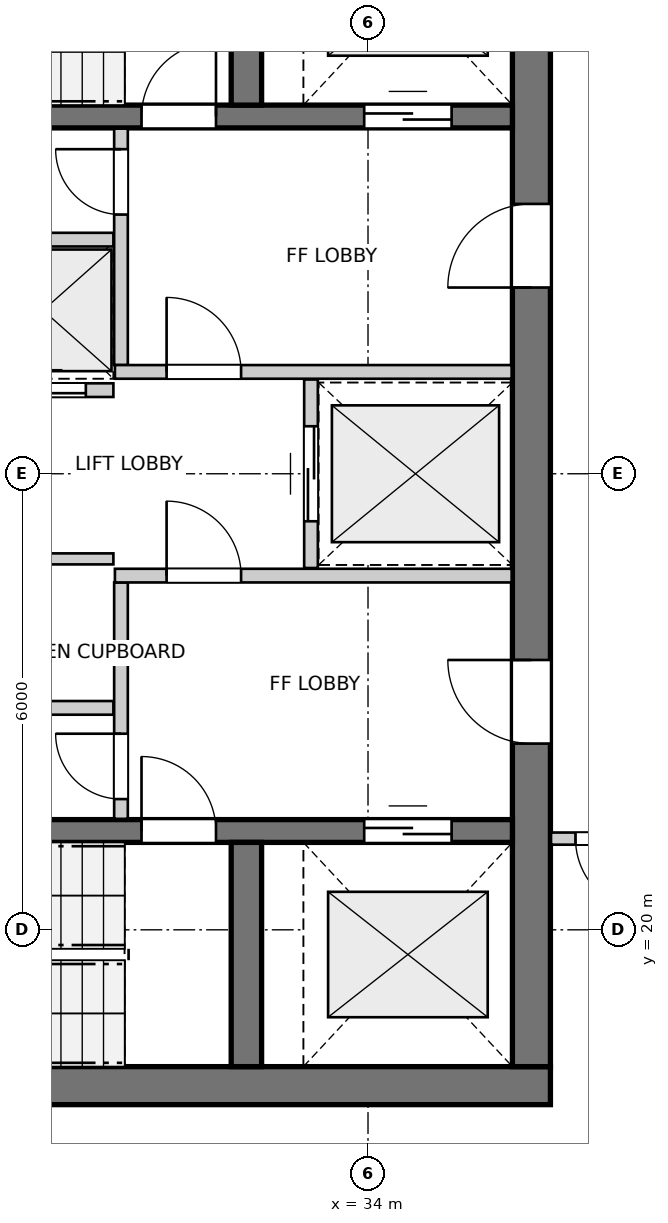
"""IFC4 building model, lengths in metres.
Left out: names, types, materials, properties, quantities, classifications, styles, units other than length and angle.
Written with IfcOpenShell. Run it as: python <this file> out.ifc"""

import sys

from ifc_helpers import new_model, si_unit, direction, frame, frame_2d, origin, place, context, subcontext, project, spatial, rectangle, extrude, source, transform, mapped, element, fill, save


model = new_model("IFC4")
c1 = context("Model", 3, precision=1e-05, world=origin(), true_north=direction((0.0, 1.0)))
c2 = subcontext(c1, "Body", "Model", "MODEL_VIEW")
j1 = project(units=[si_unit("LENGTHUNIT", "METRE"), si_unit("PLANEANGLEUNIT", "RADIAN")], contexts=[c1])
p1 = place(None, origin())
s1 = spatial("IfcSite", under=j1, at=p1, CompositionType="ELEMENT")
p2 = place(p1, origin())
s2 = spatial("IfcBuilding", under=s1, at=p2, CompositionType="ELEMENT")
p3 = place(p2, frame((0.0, 0.0, 250.0)))
s3 = spatial("IfcBuildingStorey", under=s2, at=p3, CompositionType="ELEMENT", Elevation=250.0)
p4 = place(p3, frame((24.3, 17.95, 0.0), z_axis=(0.0, 0.0, 1.0), x_axis=(1.0, 0.0, 0.0)))
e1 = element("IfcWall", 1, at=p4, inside=s3, PredefinedType="SHEAR", context=c2, shape_type="SweptSolid", body=[
    extrude(rectangle(XDim=12.1, YDim=0.5, at=frame_2d((6.05, 0.0))), origin(), (0.0, 0.0, 1.0), 2.95),
])
p5 = place(p3, frame((36.15, 18.2, 0.0), z_axis=(0.0, 0.0, 1.0), x_axis=(0.0, 1.0, 0.0)))
e2 = element("IfcWall", 2, at=p5, inside=s3, PredefinedType="SHEAR", context=c2, shape_type="SweptSolid", body=[
    extrude(rectangle(XDim=15.6, YDim=0.5, at=frame_2d((7.8, 0.0))), origin(), (0.0, 0.0, 1.0), 2.95),
])
p6 = place(p5, frame((4.25, 0.0, 0.0)))
e3 = element("IfcOpeningElement", 3, at=p6, cuts=e2, PredefinedType="OPENING", context=c2, shape_type="SweptSolid", body=[
    extrude(rectangle(XDim=1.1, YDim=2.15, at=frame_2d((0.55, 1.075))), frame((0.0, 0.26, 0.0), z_axis=(0.0, -1.0, 0.0), x_axis=(1.0, 0.0, 0.0)), (0.0, 0.0, 1.0), 0.52),
])
p7 = place(p5, frame((10.25, 0.0, 0.0)))
e4 = element("IfcOpeningElement", 4, at=p7, cuts=e2, PredefinedType="OPENING", context=c2, shape_type="SweptSolid", body=[
    extrude(rectangle(XDim=1.1, YDim=2.15, at=frame_2d((0.55, 1.075))), frame((0.0, 0.26, 0.0), z_axis=(0.0, -1.0, 0.0), x_axis=(1.0, 0.0, 0.0)), (0.0, 0.0, 1.0), 0.52),
])
p8 = place(p3, frame((24.8, 21.3, 0.0), z_axis=(0.0, 0.0, 1.0), x_axis=(1.0, 0.0, 0.0)))
e5 = element("IfcWall", 5, at=p8, inside=s3, PredefinedType="SHEAR", context=c2, shape_type="SweptSolid", body=[
    extrude(rectangle(XDim=11.1, YDim=0.3, at=frame_2d((5.55, 0.0))), origin(), (0.0, 0.0, 1.0), 2.95),
])
p9 = place(p8, frame((6.22, 0.0, 0.0)))
e6 = element("IfcOpeningElement", 6, at=p9, cuts=e5, PredefinedType="OPENING", context=c2, shape_type="SweptSolid", body=[
    extrude(rectangle(XDim=0.98, YDim=2.15, at=frame_2d((0.49, 1.075))), frame((0.0, 0.16, 0.0), z_axis=(0.0, -1.0, 0.0), x_axis=(1.0, 0.0, 0.0)), (0.0, 0.0, 1.0), 0.32),
])
p10 = place(p8, frame((9.15, 0.0, 0.0)))
e7 = element("IfcOpeningElement", 7, at=p10, cuts=e5, PredefinedType="OPENING", context=c2, shape_type="SweptSolid", body=[
    extrude(rectangle(XDim=1.15, YDim=2.15, at=frame_2d((0.575, 1.075))), frame((0.0, 0.16, 0.0), z_axis=(0.0, -1.0, 0.0), x_axis=(1.0, 0.0, 0.0)), (0.0, 0.0, 1.0), 0.32),
])
p11 = place(p3, frame((32.4, 18.2, 0.0), z_axis=(0.0, 0.0, 1.0), x_axis=(0.0, 1.0, 0.0)))
e8 = element("IfcWall", 8, at=p11, inside=s3, PredefinedType="SHEAR", context=c2, shape_type="SweptSolid", body=[
    extrude(rectangle(XDim=2.95, YDim=0.4, at=frame_2d((1.475, 0.0))), origin(), (0.0, 0.0, 1.0), 2.95),
])
p12 = place(p3, frame((24.8, 30.7, 0.0), z_axis=(0.0, 0.0, 1.0), x_axis=(1.0, 0.0, 0.0)))
e9 = element("IfcWall", 9, at=p12, inside=s3, PredefinedType="SHEAR", context=c2, shape_type="SweptSolid", body=[
    extrude(rectangle(XDim=11.1, YDim=0.3, at=frame_2d((5.55, 0.0))), origin(), (0.0, 0.0, 1.0), 2.95),
])
p13 = place(p12, frame((6.22, 0.0, 0.0)))
e10 = element("IfcOpeningElement", 10, at=p13, cuts=e9, PredefinedType="OPENING", context=c2, shape_type="SweptSolid", body=[
    extrude(rectangle(XDim=0.98, YDim=2.15, at=frame_2d((0.49, 1.075))), frame((0.0, 0.16, 0.0), z_axis=(0.0, -1.0, 0.0), x_axis=(1.0, 0.0, 0.0)), (0.0, 0.0, 1.0), 0.32),
])
p14 = place(p12, frame((9.15, 0.0, 0.0)))
e11 = element("IfcOpeningElement", 11, at=p14, cuts=e9, PredefinedType="OPENING", context=c2, shape_type="SweptSolid", body=[
    extrude(rectangle(XDim=1.15, YDim=2.15, at=frame_2d((0.575, 1.075))), frame((0.0, 0.16, 0.0), z_axis=(0.0, -1.0, 0.0), x_axis=(1.0, 0.0, 0.0)), (0.0, 0.0, 1.0), 0.32),
])
p15 = place(p3, frame((32.4, 30.85, 0.0), z_axis=(0.0, 0.0, 1.0), x_axis=(0.0, 1.0, 0.0)))
e12 = element("IfcWall", 12, at=p15, inside=s3, PredefinedType="SHEAR", context=c2, shape_type="SweptSolid", body=[
    extrude(rectangle(XDim=2.95, YDim=0.4, at=frame_2d((1.475, 0.0))), origin(), (0.0, 0.0, 1.0), 2.95),
])
p16 = place(p3, frame((30.75, 21.46, 0.0), z_axis=(0.0, 0.0, 1.0), x_axis=(0.0, 1.0, 0.0)))
e13 = element("IfcWall", 13, at=p16, inside=s3, PredefinedType="PARTITIONING", context=c2, shape_type="SweptSolid", body=[
    extrude(rectangle(XDim=3.11, YDim=0.18, at=frame_2d((1.555, 0.0))), origin(), (0.0, 0.0, 1.0), 2.95),
])
p17 = place(p16, frame((0.26, 0.0, 0.0)))
e14 = element("IfcOpeningElement", 14, at=p17, cuts=e13, PredefinedType="OPENING", context=c2, shape_type="SweptSolid", body=[
    extrude(rectangle(XDim=0.86, YDim=2.05, at=frame_2d((0.43, 1.025))), frame((0.0, 0.1, 0.0), z_axis=(0.0, -1.0, 0.0), x_axis=(1.0, 0.0, 0.0)), (0.0, 0.0, 1.0), 0.2),
])
p18 = place(p3, frame((30.67, 24.66, 0.0), z_axis=(0.0, 0.0, 1.0), x_axis=(1.0, 0.0, 0.0)))
e15 = element("IfcWall", 15, at=p18, inside=s3, PredefinedType="PARTITIONING", context=c2, shape_type="SweptSolid", body=[
    extrude(rectangle(XDim=5.22, YDim=0.18, at=frame_2d((2.61, 0.0))), origin(), (0.0, 0.0, 1.0), 2.95),
])
p19 = place(p18, frame((0.68, 0.0, 0.0)))
e16 = element("IfcOpeningElement", 16, at=p19, cuts=e15, PredefinedType="OPENING", context=c2, shape_type="SweptSolid", body=[
    extrude(rectangle(XDim=0.98, YDim=2.15, at=frame_2d((0.49, 1.075))), frame((0.0, 0.1, 0.0), z_axis=(0.0, -1.0, 0.0), x_axis=(1.0, 0.0, 0.0)), (0.0, 0.0, 1.0), 0.2),
])
p20 = place(p3, frame((30.75, 27.43, 0.0), z_axis=(0.0, 0.0, 1.0), x_axis=(0.0, 1.0, 0.0)))
e17 = element("IfcWall", 17, at=p20, inside=s3, PredefinedType="PARTITIONING", context=c2, shape_type="SweptSolid", body=[
    extrude(rectangle(XDim=3.11, YDim=0.18, at=frame_2d((1.555, 0.0))), origin(), (0.0, 0.0, 1.0), 2.95),
])
p21 = place(p20, frame((1.98, 0.0, 0.0)))
e18 = element("IfcOpeningElement", 18, at=p21, cuts=e17, PredefinedType="OPENING", context=c2, shape_type="SweptSolid", body=[
    extrude(rectangle(XDim=0.86, YDim=2.05, at=frame_2d((0.43, 1.025))), frame((0.0, 0.1, 0.0), z_axis=(0.0, -1.0, 0.0), x_axis=(1.0, 0.0, 0.0)), (0.0, 0.0, 1.0), 0.2),
])
p22 = place(p3, frame((30.67, 27.34, 0.0), z_axis=(0.0, 0.0, 1.0), x_axis=(1.0, 0.0, 0.0)))
e19 = element("IfcWall", 19, at=p22, inside=s3, PredefinedType="PARTITIONING", context=c2, shape_type="SweptSolid", body=[
    extrude(rectangle(XDim=5.22, YDim=0.18, at=frame_2d((2.61, 0.0))), origin(), (0.0, 0.0, 1.0), 2.95),
])
p23 = place(p22, frame((0.68, 0.0, 0.0)))
e20 = element("IfcOpeningElement", 20, at=p23, cuts=e19, PredefinedType="OPENING", context=c2, shape_type="SweptSolid", body=[
    extrude(rectangle(XDim=0.98, YDim=2.15, at=frame_2d((0.49, 1.075))), frame((0.0, 0.1, 0.0), z_axis=(0.0, -1.0, 0.0), x_axis=(1.0, 0.0, 0.0)), (0.0, 0.0, 1.0), 0.2),
])
p24 = place(p3, frame((33.25, 24.76, 0.0), z_axis=(0.0, 0.0, 1.0), x_axis=(0.0, 1.0, 0.0)))
e21 = element("IfcWall", 21, at=p24, inside=s3, PredefinedType="PARTITIONING", context=c2, shape_type="SweptSolid", body=[
    extrude(rectangle(XDim=2.48, YDim=0.18, at=frame_2d((1.24, 0.0))), origin(), (0.0, 0.0, 1.0), 2.95),
])
p25 = place(p24, frame((0.615, 0.0, 0.0)))
e22 = element("IfcOpeningElement", 22, at=p25, cuts=e21, PredefinedType="OPENING", context=c2, shape_type="SweptSolid", body=[
    extrude(rectangle(XDim=1.25, YDim=2.15, at=frame_2d((0.625, 1.075))), frame((0.0, 0.1, 0.0), z_axis=(0.0, -1.0, 0.0), x_axis=(1.0, 0.0, 0.0)), (0.0, 0.0, 1.0), 0.2),
])
p26 = place(p3, frame((24.81, 22.92, 0.0), z_axis=(0.0, 0.0, 1.0), x_axis=(1.0, 0.0, 0.0)))
e23 = element("IfcWall", 23, at=p26, inside=s3, PredefinedType="PARTITIONING", context=c2, shape_type="SweptSolid", body=[
    extrude(rectangle(XDim=5.84, YDim=0.18, at=frame_2d((2.92, 0.0))), origin(), (0.0, 0.0, 1.0), 2.95),
])
p27 = place(p3, frame((28.13, 24.88, 0.0), z_axis=(0.0, 0.0, 1.0), x_axis=(1.0, 0.0, 0.0)))
e24 = element("IfcWall", 24, at=p27, inside=s3, PredefinedType="PARTITIONING", context=c2, shape_type="SweptSolid", body=[
    extrude(rectangle(XDim=2.52, YDim=0.145, at=frame_2d((1.26, 0.0))), origin(), (0.0, 0.0, 1.0), 2.95),
])
p28 = place(p27, frame((0.82, 0.0, 0.0)))
e25 = element("IfcOpeningElement", 25, at=p28, cuts=e24, PredefinedType="OPENING", context=c2, shape_type="SweptSolid", body=[
    extrude(rectangle(XDim=0.86, YDim=2.05, at=frame_2d((0.43, 1.025))), frame((0.0, 0.083, 0.0), z_axis=(0.0, -1.0, 0.0), x_axis=(1.0, 0.0, 0.0)), (0.0, 0.0, 1.0), 0.165),
])
p29 = place(p3, frame((24.81, 29.08, 0.0), z_axis=(0.0, 0.0, 1.0), x_axis=(1.0, 0.0, 0.0)))
e26 = element("IfcWall", 26, at=p29, inside=s3, PredefinedType="PARTITIONING", context=c2, shape_type="SweptSolid", body=[
    extrude(rectangle(XDim=5.84, YDim=0.18, at=frame_2d((2.92, 0.0))), origin(), (0.0, 0.0, 1.0), 2.95),
])
p30 = place(p3, frame((28.825, 27.1, 0.0), z_axis=(0.0, 0.0, 1.0), x_axis=(1.0, 0.0, 0.0)))
e27 = element("IfcWall", 27, at=p30, inside=s3, PredefinedType="PARTITIONING", context=c2, shape_type="SweptSolid", body=[
    extrude(rectangle(XDim=1.825, YDim=0.18, at=frame_2d((0.913, 0.0))), origin(), (0.0, 0.0, 1.0), 2.95),
])
p31 = place(p30, frame((0.363, 0.0, 0.0)))
e28 = element("IfcOpeningElement", 28, at=p31, cuts=e27, PredefinedType="OPENING", context=c2, shape_type="SweptSolid", body=[
    extrude(rectangle(XDim=1.1, YDim=2.15, at=frame_2d((0.55, 1.075))), frame((0.0, 0.1, 0.0), z_axis=(0.0, -1.0, 0.0), x_axis=(1.0, 0.0, 0.0)), (0.0, 0.0, 1.0), 0.2),
])
p32 = place(p3, frame((38.02, 21.2, 0.0), z_axis=(0.0, 0.0, 1.0), x_axis=(-1.0, 0.0, 0.0)))
e29 = element("IfcWall", 29, at=p32, inside=s3, PredefinedType="PARTITIONING", context=c2, shape_type="SweptSolid", body=[
    extrude(rectangle(XDim=1.612, YDim=0.16, at=frame_2d((0.806, 0.0))), origin(), (0.0, 0.0, 1.0), 2.95),
])
p33 = place(p32, frame((0.33, 0.0, 0.0)))
e30 = element("IfcOpeningElement", 30, at=p33, cuts=e29, PredefinedType="OPENING", context=c2, shape_type="SweptSolid", body=[
    extrude(rectangle(XDim=0.96, YDim=2.1, at=frame_2d((0.48, 1.05))), frame((0.0, 0.09, 0.0), z_axis=(0.0, -1.0, 0.0), x_axis=(1.0, 0.0, 0.0)), (0.0, 0.0, 1.0), 0.18),
])
m1 = source(origin(), c2, "Body", "SweptSolid", [
    extrude(rectangle(XDim=0.98, YDim=2.15, at=frame_2d((0.49, 1.075))), frame((0.0, 0.025, 0.0), z_axis=(0.0, -1.0, 0.0), x_axis=(1.0, 0.0, 0.0)), (0.0, 0.0, 1.0), 0.05),
])
p34 = place(p9, origin())
e31 = element("IfcDoor", 31, at=p34, inside=s3, OperationType="SINGLE_SWING_LEFT", PredefinedType="DOOR", context=c2, shape_type="MappedRepresentation", body=[
    mapped(m1, transform((0.0, 0.0, 0.0), x_axis=(1.0, 0.0, 0.0), y_axis=(0.0, 1.0, 0.0), z_axis=(0.0, 0.0, 1.0), scale=1.0)),
])
fill(e6, e31)
m2 = source(origin(), c2, "Body", "SweptSolid", [
    extrude(rectangle(XDim=1.15, YDim=2.15, at=frame_2d((0.575, 1.075))), frame((0.0, 0.025, 0.0), z_axis=(0.0, -1.0, 0.0), x_axis=(1.0, 0.0, 0.0)), (0.0, 0.0, 1.0), 0.05),
])
p35 = place(p10, origin())
e32 = element("IfcDoor", 32, at=p35, inside=s3, OperationType="DOUBLE_DOOR_SLIDING", PredefinedType="DOOR", context=c2, shape_type="MappedRepresentation", body=[
    mapped(m2, transform((0.0, 0.0, 0.0), x_axis=(1.0, 0.0, 0.0), y_axis=(0.0, 1.0, 0.0), z_axis=(0.0, 0.0, 1.0), scale=1.0)),
])
fill(e7, e32)
p36 = place(p13, origin())
e33 = element("IfcDoor", 33, at=p36, inside=s3, OperationType="SINGLE_SWING_RIGHT", PredefinedType="DOOR", context=c2, shape_type="MappedRepresentation", body=[
    mapped(m1, transform((0.0, 0.0, 0.0), x_axis=(1.0, 0.0, 0.0), y_axis=(0.0, 1.0, 0.0), z_axis=(0.0, 0.0, 1.0), scale=1.0)),
])
fill(e10, e33)
p37 = place(p14, origin())
e34 = element("IfcDoor", 34, at=p37, inside=s3, OperationType="DOUBLE_DOOR_SLIDING", PredefinedType="DOOR", context=c2, shape_type="MappedRepresentation", body=[
    mapped(m2, transform((0.0, 0.0, 0.0), x_axis=(1.0, 0.0, 0.0), y_axis=(0.0, 1.0, 0.0), z_axis=(0.0, 0.0, 1.0), scale=1.0)),
])
fill(e11, e34)
m3 = source(origin(), c2, "Body", "SweptSolid", [
    extrude(rectangle(XDim=1.1, YDim=2.15, at=frame_2d((0.55, 1.075))), frame((0.0, 0.025, 0.0), z_axis=(0.0, -1.0, 0.0), x_axis=(1.0, 0.0, 0.0)), (0.0, 0.0, 1.0), 0.05),
])
p38 = place(p6, origin())
e35 = element("IfcDoor", 35, at=p38, inside=s3, OperationType="SINGLE_SWING_RIGHT", PredefinedType="DOOR", context=c2, shape_type="MappedRepresentation", body=[
    mapped(m3, transform((0.0, 0.0, 0.0), x_axis=(1.0, 0.0, 0.0), y_axis=(0.0, 1.0, 0.0), z_axis=(0.0, 0.0, 1.0), scale=1.0)),
])
fill(e3, e35)
p39 = place(p7, origin())
e36 = element("IfcDoor", 36, at=p39, inside=s3, OperationType="SINGLE_SWING_LEFT", PredefinedType="DOOR", context=c2, shape_type="MappedRepresentation", body=[
    mapped(m3, transform((0.0, 0.0, 0.0), x_axis=(1.0, 0.0, 0.0), y_axis=(0.0, 1.0, 0.0), z_axis=(0.0, 0.0, 1.0), scale=1.0)),
])
fill(e4, e36)
m4 = source(origin(), c2, "Body", "SweptSolid", [
    extrude(rectangle(XDim=0.86, YDim=2.05, at=frame_2d((0.43, 1.025))), frame((0.0, 0.025, 0.0), z_axis=(0.0, -1.0, 0.0), x_axis=(1.0, 0.0, 0.0)), (0.0, 0.0, 1.0), 0.05),
])
p40 = place(p17, origin())
e37 = element("IfcDoor", 37, at=p40, inside=s3, OperationType="SINGLE_SWING_RIGHT", PredefinedType="DOOR", context=c2, shape_type="MappedRepresentation", body=[
    mapped(m4, transform((0.0, 0.0, 0.0), x_axis=(1.0, 0.0, 0.0), y_axis=(0.0, 1.0, 0.0), z_axis=(0.0, 0.0, 1.0), scale=1.0)),
])
fill(e14, e37)
p41 = place(p19, origin())
e38 = element("IfcDoor", 38, at=p41, inside=s3, OperationType="SINGLE_SWING_LEFT", PredefinedType="DOOR", context=c2, shape_type="MappedRepresentation", body=[
    mapped(m1, transform((0.0, 0.0, 0.0), x_axis=(1.0, 0.0, 0.0), y_axis=(0.0, 1.0, 0.0), z_axis=(0.0, 0.0, 1.0), scale=1.0)),
])
fill(e16, e38)
p42 = place(p21, origin())
e39 = element("IfcDoor", 39, at=p42, inside=s3, OperationType="SINGLE_SWING_RIGHT", PredefinedType="DOOR", context=c2, shape_type="MappedRepresentation", body=[
    mapped(m4, transform((0.0, 0.0, 0.0), x_axis=(1.0, 0.0, 0.0), y_axis=(0.0, 1.0, 0.0), z_axis=(0.0, 0.0, 1.0), scale=1.0)),
])
fill(e18, e39)
p43 = place(p23, origin())
e40 = element("IfcDoor", 40, at=p43, inside=s3, OperationType="SINGLE_SWING_LEFT", PredefinedType="DOOR", context=c2, shape_type="MappedRepresentation", body=[
    mapped(m1, transform((0.0, 0.0, 0.0), x_axis=(1.0, 0.0, 0.0), y_axis=(0.0, 1.0, 0.0), z_axis=(0.0, 0.0, 1.0), scale=1.0)),
])
fill(e20, e40)
m5 = source(origin(), c2, "Body", "SweptSolid", [
    extrude(rectangle(XDim=1.25, YDim=2.15, at=frame_2d((0.625, 1.075))), frame((0.0, 0.025, 0.0), z_axis=(0.0, -1.0, 0.0), x_axis=(1.0, 0.0, 0.0)), (0.0, 0.0, 1.0), 0.05),
])
p44 = place(p25, origin())
e41 = element("IfcDoor", 41, at=p44, inside=s3, OperationType="DOUBLE_DOOR_SLIDING", PredefinedType="DOOR", context=c2, shape_type="MappedRepresentation", body=[
    mapped(m5, transform((0.0, 0.0, 0.0), x_axis=(1.0, 0.0, 0.0), y_axis=(0.0, 1.0, 0.0), z_axis=(0.0, 0.0, 1.0), scale=1.0)),
])
fill(e22, e41)
p45 = place(p31, origin())
e42 = element("IfcDoor", 42, at=p45, inside=s3, OperationType="DOUBLE_DOOR_SLIDING", PredefinedType="DOOR", context=c2, shape_type="MappedRepresentation", body=[
    mapped(m3, transform((0.0, 0.0, 0.0), x_axis=(1.0, 0.0, 0.0), y_axis=(0.0, 1.0, 0.0), z_axis=(0.0, 0.0, 1.0), scale=1.0)),
])
fill(e28, e42)
m6 = source(origin(), c2, "Body", "SweptSolid", [
    extrude(rectangle(XDim=0.96, YDim=2.1, at=frame_2d((0.48, 1.05))), frame((0.0, 0.025, 0.0), z_axis=(0.0, -1.0, 0.0), x_axis=(1.0, 0.0, 0.0)), (0.0, 0.0, 1.0), 0.05),
])
p46 = place(p33, origin())
e43 = element("IfcDoor", 43, at=p46, inside=s3, OperationType="SINGLE_SWING_LEFT", PredefinedType="DOOR", context=c2, shape_type="MappedRepresentation", body=[
    mapped(m6, transform((0.0, 0.0, 0.0), x_axis=(1.0, 0.0, 0.0), y_axis=(0.0, 1.0, 0.0), z_axis=(0.0, 0.0, 1.0), scale=1.0)),
])
fill(e30, e43)
save(model, sys.argv[1])
